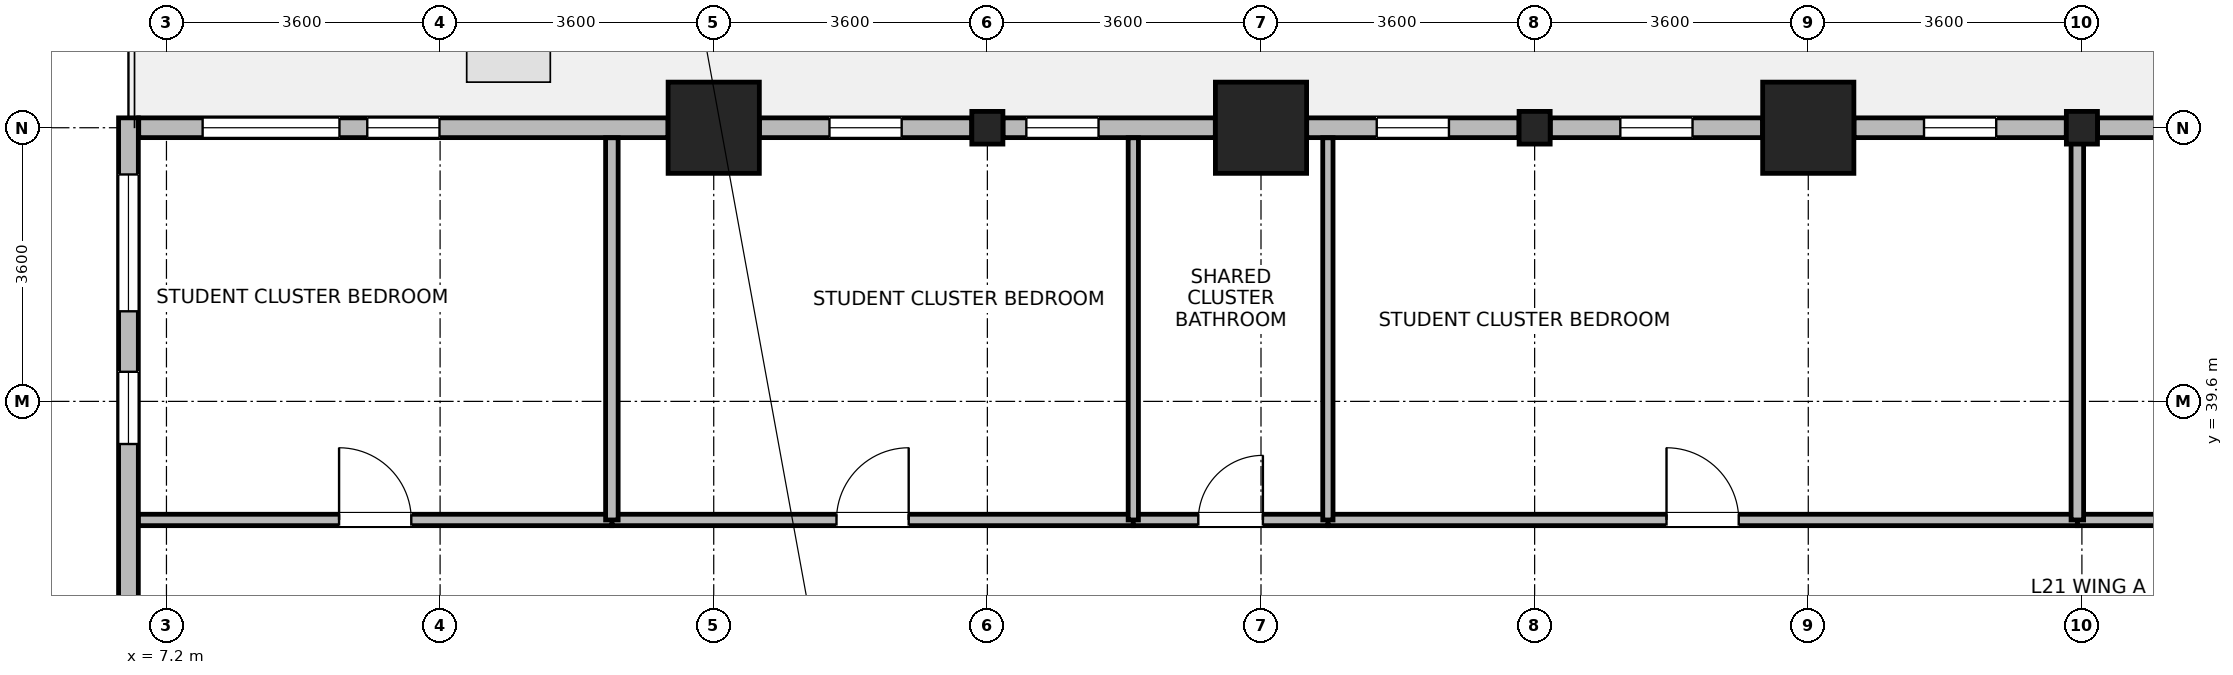
"""IFC4 building model, lengths in metres.
Left out: names, types, materials, properties, quantities, classifications, styles, units other than length and angle.
Written with IfcOpenShell. Run it as: python <this file> out.ifc"""

import sys

from ifc_helpers import new_model, si_unit, direction, frame, frame_2d, origin, origin_2d, place, context, subcontext, project, spatial, rectangle, i_section, extrude, source, transform, mapped, element, fill, save


model = new_model("IFC4")
c1 = context("Model", 3, precision=1e-05, world=origin(), true_north=direction((0.0, 1.0)))
c2 = subcontext(c1, "Body", "Model", "MODEL_VIEW")
j1 = project(units=[si_unit("LENGTHUNIT", "METRE"), si_unit("PLANEANGLEUNIT", "RADIAN")], contexts=[c1])
p1 = place(None, origin())
s1 = spatial("IfcSite", under=j1, at=p1, CompositionType="ELEMENT")
p2 = place(p1, origin())
s2 = spatial("IfcBuilding", under=s1, at=p2, CompositionType="ELEMENT")
p3 = place(p2, frame((0.0, 0.0, 86.0)))
s3 = spatial("IfcBuildingStorey", under=s2, at=p3, CompositionType="ELEMENT", Elevation=86.0)
m1 = source(origin(), c2, "Body", "SweptSolid", [
    extrude(rectangle(XDim=1.2, YDim=1.2, at=origin_2d()), origin(), (0.0, 0.0, 1.0), 3.7),
])
for number, where, z_axis, x_axis in (
    (1, (14.4, 43.2, 0.0), (0.0, 0.0, 1.0), (1.0, 0.0, 0.0)),
    (2, (21.6, 43.2, 0.0), (0.0, 0.0, 1.0), (1.0, 0.0, 0.0)),
    (3, (28.8, 43.2, 0.0), (0.0, 0.0, 1.0), (1.0, 0.0, 0.0)),
):
    element("IfcColumn", number, at=place(p3, frame(where, z_axis=z_axis, x_axis=x_axis)), inside=s3, PredefinedType="COLUMN", context=c2, shape_type="MappedRepresentation", body=[
        mapped(m1, transform((0.0, 0.0, 0.0), x_axis=(1.0, 0.0, 0.0), y_axis=(0.0, 1.0, 0.0), z_axis=(0.0, 0.0, 1.0), scale=1.0)),
    ])
m2 = source(origin(), c2, "Body", "SweptSolid", [
    extrude(i_section(OverallWidth=0.409, OverallDepth=0.43, WebThickness=0.024, FlangeThickness=0.033, FilletRadius=0.015, at=origin_2d()), origin(), (0.0, 0.0, 1.0), 3.7),
])
for number, where, z_axis, x_axis in (
    (4, (18.0, 43.2, 0.0), (0.0, 0.0, 1.0), (1.0, 0.0, 0.0)),
    (5, (25.2, 43.2, 0.0), (0.0, 0.0, 1.0), (1.0, 0.0, 0.0)),
    (6, (32.4, 43.2, 0.0), (0.0, 0.0, 1.0), (1.0, 0.0, 0.0)),
):
    element("IfcColumn", number, at=place(p3, frame(where, z_axis=z_axis, x_axis=x_axis)), inside=s3, PredefinedType="COLUMN", context=c2, shape_type="MappedRepresentation", body=[
        mapped(m2, transform((0.0, 0.0, 0.0), x_axis=(1.0, 0.0, 0.0), y_axis=(0.0, 1.0, 0.0), z_axis=(0.0, 0.0, 1.0), scale=1.0)),
    ])
p4 = place(p3, frame((32.605, 43.2, 0.0), z_axis=(0.0, 0.0, 1.0), x_axis=(1.0, 0.0, 0.0)))
e7 = element("IfcWall", 7, at=p4, inside=s3, PredefinedType="STANDARD", context=c2, shape_type="SweptSolid", body=[
    extrude(rectangle(XDim=2.793, YDim=0.26, at=frame_2d((1.397, 0.0))), origin(), (0.0, 0.0, 1.0), 2.93),
])
p5 = place(p4, frame((0.922, 0.0, 0.85)))
e8 = element("IfcOpeningElement", 8, at=p5, cuts=e7, PredefinedType="OPENING", context=c2, shape_type="SweptSolid", body=[
    extrude(rectangle(XDim=0.95, YDim=1.75, at=frame_2d((0.475, 0.875))), frame((0.0, 0.14, 0.0), z_axis=(0.0, -1.0, 0.0), x_axis=(1.0, 0.0, 0.0)), (0.0, 0.0, 1.0), 0.28),
])
p6 = place(p3, frame((29.401, 43.2, 0.0), z_axis=(0.0, 0.0, 1.0), x_axis=(1.0, 0.0, 0.0)))
e9 = element("IfcWall", 9, at=p6, inside=s3, PredefinedType="STANDARD", context=c2, shape_type="SweptSolid", body=[
    extrude(rectangle(XDim=2.794, YDim=0.26, at=frame_2d((1.397, 0.0))), origin(), (0.0, 0.0, 1.0), 2.93),
])
p7 = place(p6, frame((0.922, 0.0, 0.85)))
e10 = element("IfcOpeningElement", 10, at=p7, cuts=e9, PredefinedType="OPENING", context=c2, shape_type="SweptSolid", body=[
    extrude(rectangle(XDim=0.95, YDim=1.75, at=frame_2d((0.475, 0.875))), frame((0.0, 0.14, 0.0), z_axis=(0.0, -1.0, 0.0), x_axis=(1.0, 0.0, 0.0)), (0.0, 0.0, 1.0), 0.28),
])
p8 = place(p3, frame((25.406, 43.2, 0.0), z_axis=(0.0, 0.0, 1.0), x_axis=(1.0, 0.0, 0.0)))
e11 = element("IfcWall", 11, at=p8, inside=s3, PredefinedType="STANDARD", context=c2, shape_type="SweptSolid", body=[
    extrude(rectangle(XDim=2.793, YDim=0.26, at=frame_2d((1.397, 0.0))), origin(), (0.0, 0.0, 1.0), 2.93),
])
p9 = place(p8, frame((0.922, 0.0, 0.85)))
e12 = element("IfcOpeningElement", 12, at=p9, cuts=e11, PredefinedType="OPENING", context=c2, shape_type="SweptSolid", body=[
    extrude(rectangle(XDim=0.95, YDim=1.75, at=frame_2d((0.475, 0.875))), frame((0.0, 0.14, 0.0), z_axis=(0.0, -1.0, 0.0), x_axis=(1.0, 0.0, 0.0)), (0.0, 0.0, 1.0), 0.28),
])
p10 = place(p3, frame((22.201, 43.2, 0.0), z_axis=(0.0, 0.0, 1.0), x_axis=(1.0, 0.0, 0.0)))
e13 = element("IfcWall", 13, at=p10, inside=s3, PredefinedType="STANDARD", context=c2, shape_type="SweptSolid", body=[
    extrude(rectangle(XDim=2.793, YDim=0.26, at=frame_2d((1.397, 0.0))), origin(), (0.0, 0.0, 1.0), 2.93),
])
p11 = place(p10, frame((0.922, 0.0, 0.85)))
e14 = element("IfcOpeningElement", 14, at=p11, cuts=e13, PredefinedType="OPENING", context=c2, shape_type="SweptSolid", body=[
    extrude(rectangle(XDim=0.95, YDim=1.75, at=frame_2d((0.475, 0.875))), frame((0.0, 0.14, 0.0), z_axis=(0.0, -1.0, 0.0), x_axis=(1.0, 0.0, 0.0)), (0.0, 0.0, 1.0), 0.28),
])
p12 = place(p3, frame((18.206, 43.2, 0.0), z_axis=(0.0, 0.0, 1.0), x_axis=(1.0, 0.0, 0.0)))
e15 = element("IfcWall", 15, at=p12, inside=s3, PredefinedType="STANDARD", context=c2, shape_type="SweptSolid", body=[
    extrude(rectangle(XDim=2.793, YDim=0.26, at=frame_2d((1.397, 0.0))), origin(), (0.0, 0.0, 1.0), 2.93),
])
p13 = place(p12, frame((0.307, 0.0, 0.85)))
e16 = element("IfcOpeningElement", 16, at=p13, cuts=e15, PredefinedType="OPENING", context=c2, shape_type="SweptSolid", body=[
    extrude(rectangle(XDim=0.95, YDim=1.75, at=frame_2d((0.475, 0.875))), frame((0.0, 0.14, 0.0), z_axis=(0.0, -1.0, 0.0), x_axis=(1.0, 0.0, 0.0)), (0.0, 0.0, 1.0), 0.28),
])
p14 = place(p3, frame((15.001, 43.2, 0.0), z_axis=(0.0, 0.0, 1.0), x_axis=(1.0, 0.0, 0.0)))
e17 = element("IfcWall", 17, at=p14, inside=s3, PredefinedType="STANDARD", context=c2, shape_type="SweptSolid", body=[
    extrude(rectangle(XDim=2.793, YDim=0.26, at=frame_2d((1.397, 0.0))), origin(), (0.0, 0.0, 1.0), 2.93),
])
p15 = place(p14, frame((0.922, 0.0, 0.85)))
e18 = element("IfcOpeningElement", 18, at=p15, cuts=e17, PredefinedType="OPENING", context=c2, shape_type="SweptSolid", body=[
    extrude(rectangle(XDim=0.95, YDim=1.75, at=frame_2d((0.475, 0.875))), frame((0.0, 0.14, 0.0), z_axis=(0.0, -1.0, 0.0), x_axis=(1.0, 0.0, 0.0)), (0.0, 0.0, 1.0), 0.28),
])
p16 = place(p3, frame((6.835, 43.2, 0.0), z_axis=(0.0, 0.0, 1.0), x_axis=(1.0, 0.0, 0.0)))
e19 = element("IfcWall", 19, at=p16, inside=s3, PredefinedType="STANDARD", context=c2, shape_type="SweptSolid", body=[
    extrude(rectangle(XDim=6.964, YDim=0.26, at=frame_2d((3.482, 0.0))), origin(), (0.0, 0.0, 1.0), 3.43),
])
p17 = place(p16, frame((0.841, 0.0, 0.85)))
e20 = element("IfcOpeningElement", 20, at=p17, cuts=e19, PredefinedType="OPENING", context=c2, shape_type="SweptSolid", body=[
    extrude(rectangle(XDim=1.8, YDim=1.85, at=frame_2d((0.9, 0.925))), frame((0.0, 0.14, 0.0), z_axis=(0.0, -1.0, 0.0), x_axis=(1.0, 0.0, 0.0)), (0.0, 0.0, 1.0), 0.28),
])
p18 = place(p16, frame((3.007, 0.0, 0.85)))
e21 = element("IfcOpeningElement", 21, at=p18, cuts=e19, PredefinedType="OPENING", context=c2, shape_type="SweptSolid", body=[
    extrude(rectangle(XDim=0.95, YDim=1.75, at=frame_2d((0.475, 0.875))), frame((0.0, 0.14, 0.0), z_axis=(0.0, -1.0, 0.0), x_axis=(1.0, 0.0, 0.0)), (0.0, 0.0, 1.0), 0.28),
])
p19 = place(p3, frame((6.7, 36.751, 0.0), z_axis=(0.0, 0.0, 1.0), x_axis=(0.0, 1.0, 0.0)))
e22 = element("IfcWall", 22, at=p19, inside=s3, PredefinedType="STANDARD", context=c2, shape_type="SweptSolid", body=[
    extrude(rectangle(XDim=6.579, YDim=0.26, at=frame_2d((3.29, 0.0))), origin(), (0.0, 0.0, 1.0), 3.43),
])
p20 = place(p19, frame((4.034, 0.0, 0.85)))
e23 = element("IfcOpeningElement", 23, at=p20, cuts=e22, PredefinedType="OPENING", context=c2, shape_type="SweptSolid", body=[
    extrude(rectangle(XDim=1.8, YDim=1.85, at=frame_2d((0.9, 0.925))), frame((0.0, 0.14, 0.0), z_axis=(0.0, -1.0, 0.0), x_axis=(1.0, 0.0, 0.0)), (0.0, 0.0, 1.0), 0.28),
])
p21 = place(p19, frame((2.288, 0.0, 0.85)))
e24 = element("IfcOpeningElement", 24, at=p21, cuts=e22, PredefinedType="OPENING", context=c2, shape_type="SweptSolid", body=[
    extrude(rectangle(XDim=0.95, YDim=1.75, at=frame_2d((0.475, 0.875))), frame((0.0, 0.14, 0.0), z_axis=(0.0, -1.0, 0.0), x_axis=(1.0, 0.0, 0.0)), (0.0, 0.0, 1.0), 0.28),
])
p22 = place(p3, frame((32.34, 38.04, 0.0), z_axis=(0.0, 0.0, 1.0), x_axis=(1.0, 0.0, 0.0)))
e25 = element("IfcWall", 25, at=p22, inside=s3, PredefinedType="PARTITIONING", context=c2, shape_type="SweptSolid", body=[
    extrude(rectangle(XDim=14.4, YDim=0.15, at=frame_2d((7.2, 0.0))), origin(), (0.0, 0.0, 1.0), 3.43),
])
p23 = place(p22, frame((6.75, 0.0, 0.0)))
e26 = element("IfcOpeningElement", 26, at=p23, cuts=e25, PredefinedType="OPENING", context=c2, shape_type="SweptSolid", body=[
    extrude(rectangle(XDim=0.9, YDim=2.08, at=frame_2d((0.45, 1.04))), frame((0.0, 0.085, 0.0), z_axis=(0.0, -1.0, 0.0), x_axis=(1.0, 0.0, 0.0)), (0.0, 0.0, 1.0), 0.17),
])
p24 = place(p3, frame((22.48, 38.04, 0.0), z_axis=(0.0, 0.0, 1.0), x_axis=(1.0, 0.0, 0.0)))
e27 = element("IfcWall", 27, at=p24, inside=s3, PredefinedType="PARTITIONING", context=c2, shape_type="SweptSolid", body=[
    extrude(rectangle(XDim=9.86, YDim=0.15, at=frame_2d((4.93, 0.0))), origin(), (0.0, 0.0, 1.0), 3.43),
])
p25 = place(p24, frame((4.455, 0.0, 0.0)))
e28 = element("IfcOpeningElement", 28, at=p25, cuts=e27, PredefinedType="OPENING", context=c2, shape_type="SweptSolid", body=[
    extrude(rectangle(XDim=0.95, YDim=2.1, at=frame_2d((0.475, 1.05))), frame((0.0, 0.085, 0.0), z_axis=(0.0, -1.0, 0.0), x_axis=(1.0, 0.0, 0.0)), (0.0, 0.0, 1.0), 0.17),
])
p26 = place(p3, frame((13.06, 38.04, 0.0), z_axis=(0.0, 0.0, 1.0), x_axis=(1.0, 0.0, 0.0)))
e29 = element("IfcWall", 29, at=p26, inside=s3, PredefinedType="PARTITIONING", context=c2, shape_type="SweptSolid", body=[
    extrude(rectangle(XDim=6.86, YDim=0.15, at=frame_2d((3.43, 0.0))), origin(), (0.0, 0.0, 1.0), 3.43),
])
p27 = place(p26, frame((2.955, 0.0, 0.0)))
e30 = element("IfcOpeningElement", 30, at=p27, cuts=e29, PredefinedType="OPENING", context=c2, shape_type="SweptSolid", body=[
    extrude(rectangle(XDim=0.95, YDim=2.1, at=frame_2d((0.475, 1.05))), frame((0.0, 0.085, 0.0), z_axis=(0.0, -1.0, 0.0), x_axis=(1.0, 0.0, 0.0)), (0.0, 0.0, 1.0), 0.17),
])
p28 = place(p3, frame((6.832, 38.04, 0.0), z_axis=(0.0, 0.0, 1.0), x_axis=(1.0, 0.0, 0.0)))
e31 = element("IfcWall", 31, at=p28, inside=s3, PredefinedType="PARTITIONING", context=c2, shape_type="SweptSolid", body=[
    extrude(rectangle(XDim=6.228, YDim=0.15, at=frame_2d((3.114, 0.0))), origin(), (0.0, 0.0, 1.0), 3.43),
])
p29 = place(p28, frame((2.639, 0.0, 0.0)))
e32 = element("IfcOpeningElement", 32, at=p29, cuts=e31, PredefinedType="OPENING", context=c2, shape_type="SweptSolid", body=[
    extrude(rectangle(XDim=0.95, YDim=2.1, at=frame_2d((0.475, 1.05))), frame((0.0, 0.085, 0.0), z_axis=(0.0, -1.0, 0.0), x_axis=(1.0, 0.0, 0.0)), (0.0, 0.0, 1.0), 0.17),
])
p30 = place(p3, frame((19.92, 38.04, 0.0), z_axis=(0.0, 0.0, 1.0), x_axis=(1.0, 0.0, 0.0)))
e33 = element("IfcWall", 33, at=p30, inside=s3, PredefinedType="PARTITIONING", context=c2, shape_type="SweptSolid", body=[
    extrude(rectangle(XDim=2.56, YDim=0.15, at=frame_2d((1.28, 0.0))), origin(), (0.0, 0.0, 1.0), 3.43),
])
p31 = place(p30, frame((0.855, 0.0, 0.0)))
e34 = element("IfcOpeningElement", 34, at=p31, cuts=e33, PredefinedType="OPENING", context=c2, shape_type="SweptSolid", body=[
    extrude(rectangle(XDim=0.85, YDim=2.04, at=frame_2d((0.425, 1.02))), frame((0.0, 0.085, 0.0), z_axis=(0.0, -1.0, 0.0), x_axis=(1.0, 0.0, 0.0)), (0.0, 0.0, 1.0), 0.17),
])
p32 = place(p3, frame((13.06, 38.04, 0.0), z_axis=(0.0, 0.0, 1.0), x_axis=(0.0, 1.0, 0.0)))
e35 = element("IfcWall", 35, at=p32, inside=s3, PredefinedType="PARTITIONING", context=c2, shape_type="SweptSolid", body=[
    extrude(rectangle(XDim=5.028, YDim=0.165, at=frame_2d((2.514, 0.0))), origin(), (0.0, 0.0, 1.0), 3.43),
])
for number, where, z_axis, x_axis in (
    (36, (19.92, 38.04, 0.0), (0.0, 0.0, 1.0), (0.0, 1.0, 0.0)),
    (37, (22.48, 38.04, 0.0), (0.0, 0.0, 1.0), (0.0, 1.0, 0.0)),
):
    element("IfcWall", number, at=place(p3, frame(where, z_axis=z_axis, x_axis=x_axis)), inside=s3, PredefinedType="PARTITIONING", context=c2, shape_type="SweptSolid", body=[
        extrude(rectangle(XDim=5.028, YDim=0.135, at=frame_2d((2.514, 0.0))), origin(), (0.0, 0.0, 1.0), 3.43),
    ])
p33 = place(p3, frame((32.34, 38.04, 0.0), z_axis=(0.0, 0.0, 1.0), x_axis=(0.0, 1.0, 0.0)))
e38 = element("IfcWall", 38, at=p33, inside=s3, PredefinedType="PARTITIONING", context=c2, shape_type="SweptSolid", body=[
    extrude(rectangle(XDim=5.028, YDim=0.165, at=frame_2d((2.514, 0.0))), origin(), (0.0, 0.0, 1.0), 3.07),
])
p34 = place(p7, origin())
e39 = element("IfcWindow", 39, at=p34, inside=s3, PartitioningType="SINGLE_PANEL", PredefinedType="WINDOW", context=c2, shape_type="SweptSolid", body=[
    extrude(rectangle(XDim=0.95, YDim=1.75, at=frame_2d((0.475, 0.875))), frame((0.0, 0.03, 0.0), z_axis=(0.0, -1.0, 0.0), x_axis=(1.0, 0.0, 0.0)), (0.0, 0.0, 1.0), 0.06),
])
fill(e10, e39)
p35 = place(p9, origin())
e40 = element("IfcWindow", 40, at=p35, inside=s3, PartitioningType="SINGLE_PANEL", PredefinedType="WINDOW", context=c2, shape_type="SweptSolid", body=[
    extrude(rectangle(XDim=0.95, YDim=1.75, at=frame_2d((0.475, 0.875))), frame((0.0, 0.03, 0.0), z_axis=(0.0, -1.0, 0.0), x_axis=(1.0, 0.0, 0.0)), (0.0, 0.0, 1.0), 0.06),
])
fill(e12, e40)
p36 = place(p11, origin())
e41 = element("IfcWindow", 41, at=p36, inside=s3, PartitioningType="SINGLE_PANEL", PredefinedType="WINDOW", context=c2, shape_type="SweptSolid", body=[
    extrude(rectangle(XDim=0.95, YDim=1.75, at=frame_2d((0.475, 0.875))), frame((0.0, 0.03, 0.0), z_axis=(0.0, -1.0, 0.0), x_axis=(1.0, 0.0, 0.0)), (0.0, 0.0, 1.0), 0.06),
])
fill(e14, e41)
p37 = place(p13, origin())
e42 = element("IfcWindow", 42, at=p37, inside=s3, PartitioningType="SINGLE_PANEL", PredefinedType="WINDOW", context=c2, shape_type="SweptSolid", body=[
    extrude(rectangle(XDim=0.95, YDim=1.75, at=frame_2d((0.475, 0.875))), frame((0.0, 0.03, 0.0), z_axis=(0.0, -1.0, 0.0), x_axis=(1.0, 0.0, 0.0)), (0.0, 0.0, 1.0), 0.06),
])
fill(e16, e42)
p38 = place(p15, origin())
e43 = element("IfcWindow", 43, at=p38, inside=s3, PartitioningType="SINGLE_PANEL", PredefinedType="WINDOW", context=c2, shape_type="SweptSolid", body=[
    extrude(rectangle(XDim=0.95, YDim=1.75, at=frame_2d((0.475, 0.875))), frame((0.0, 0.03, 0.0), z_axis=(0.0, -1.0, 0.0), x_axis=(1.0, 0.0, 0.0)), (0.0, 0.0, 1.0), 0.06),
])
fill(e18, e43)
p39 = place(p17, origin())
e44 = element("IfcWindow", 44, at=p39, inside=s3, PartitioningType="SINGLE_PANEL", PredefinedType="WINDOW", context=c2, shape_type="SweptSolid", body=[
    extrude(rectangle(XDim=1.8, YDim=1.85, at=frame_2d((0.9, 0.925))), frame((0.0, 0.03, 0.0), z_axis=(0.0, -1.0, 0.0), x_axis=(1.0, 0.0, 0.0)), (0.0, 0.0, 1.0), 0.06),
])
fill(e20, e44)
p40 = place(p18, origin())
e45 = element("IfcWindow", 45, at=p40, inside=s3, PartitioningType="SINGLE_PANEL", PredefinedType="WINDOW", context=c2, shape_type="SweptSolid", body=[
    extrude(rectangle(XDim=0.95, YDim=1.75, at=frame_2d((0.475, 0.875))), frame((0.0, 0.03, 0.0), z_axis=(0.0, -1.0, 0.0), x_axis=(1.0, 0.0, 0.0)), (0.0, 0.0, 1.0), 0.06),
])
fill(e21, e45)
p41 = place(p20, origin())
e46 = element("IfcWindow", 46, at=p41, inside=s3, PartitioningType="SINGLE_PANEL", PredefinedType="WINDOW", context=c2, shape_type="SweptSolid", body=[
    extrude(rectangle(XDim=1.8, YDim=1.85, at=frame_2d((0.9, 0.925))), frame((0.0, 0.03, 0.0), z_axis=(0.0, -1.0, 0.0), x_axis=(1.0, 0.0, 0.0)), (0.0, 0.0, 1.0), 0.06),
])
fill(e23, e46)
p42 = place(p21, origin())
e47 = element("IfcWindow", 47, at=p42, inside=s3, PartitioningType="SINGLE_PANEL", PredefinedType="WINDOW", context=c2, shape_type="SweptSolid", body=[
    extrude(rectangle(XDim=0.95, YDim=1.75, at=frame_2d((0.475, 0.875))), frame((0.0, 0.03, 0.0), z_axis=(0.0, -1.0, 0.0), x_axis=(1.0, 0.0, 0.0)), (0.0, 0.0, 1.0), 0.06),
])
fill(e24, e47)
p43 = place(p25, origin())
e48 = element("IfcDoor", 48, at=p43, inside=s3, OperationType="SINGLE_SWING_LEFT", PredefinedType="DOOR", context=c2, shape_type="SweptSolid", body=[
    extrude(rectangle(XDim=0.95, YDim=2.1, at=frame_2d((0.475, 1.05))), frame((0.0, 0.025, 0.0), z_axis=(0.0, -1.0, 0.0), x_axis=(1.0, 0.0, 0.0)), (0.0, 0.0, 1.0), 0.05),
])
fill(e28, e48)
p44 = place(p27, origin())
e49 = element("IfcDoor", 49, at=p44, inside=s3, OperationType="SINGLE_SWING_RIGHT", PredefinedType="DOOR", context=c2, shape_type="SweptSolid", body=[
    extrude(rectangle(XDim=0.95, YDim=2.1, at=frame_2d((0.475, 1.05))), frame((0.0, 0.025, 0.0), z_axis=(0.0, -1.0, 0.0), x_axis=(1.0, 0.0, 0.0)), (0.0, 0.0, 1.0), 0.05),
])
fill(e30, e49)
p45 = place(p29, origin())
e50 = element("IfcDoor", 50, at=p45, inside=s3, OperationType="SINGLE_SWING_LEFT", PredefinedType="DOOR", context=c2, shape_type="SweptSolid", body=[
    extrude(rectangle(XDim=0.95, YDim=2.1, at=frame_2d((0.475, 1.05))), frame((0.0, 0.025, 0.0), z_axis=(0.0, -1.0, 0.0), x_axis=(1.0, 0.0, 0.0)), (0.0, 0.0, 1.0), 0.05),
])
fill(e32, e50)
p46 = place(p31, origin())
e51 = element("IfcDoor", 51, at=p46, inside=s3, OperationType="SINGLE_SWING_RIGHT", PredefinedType="DOOR", context=c2, shape_type="SweptSolid", body=[
    extrude(rectangle(XDim=0.85, YDim=2.04, at=frame_2d((0.425, 1.02))), frame((0.0, 0.025, 0.0), z_axis=(0.0, -1.0, 0.0), x_axis=(1.0, 0.0, 0.0)), (0.0, 0.0, 1.0), 0.05),
])
fill(e34, e51)
save(model, sys.argv[1])
